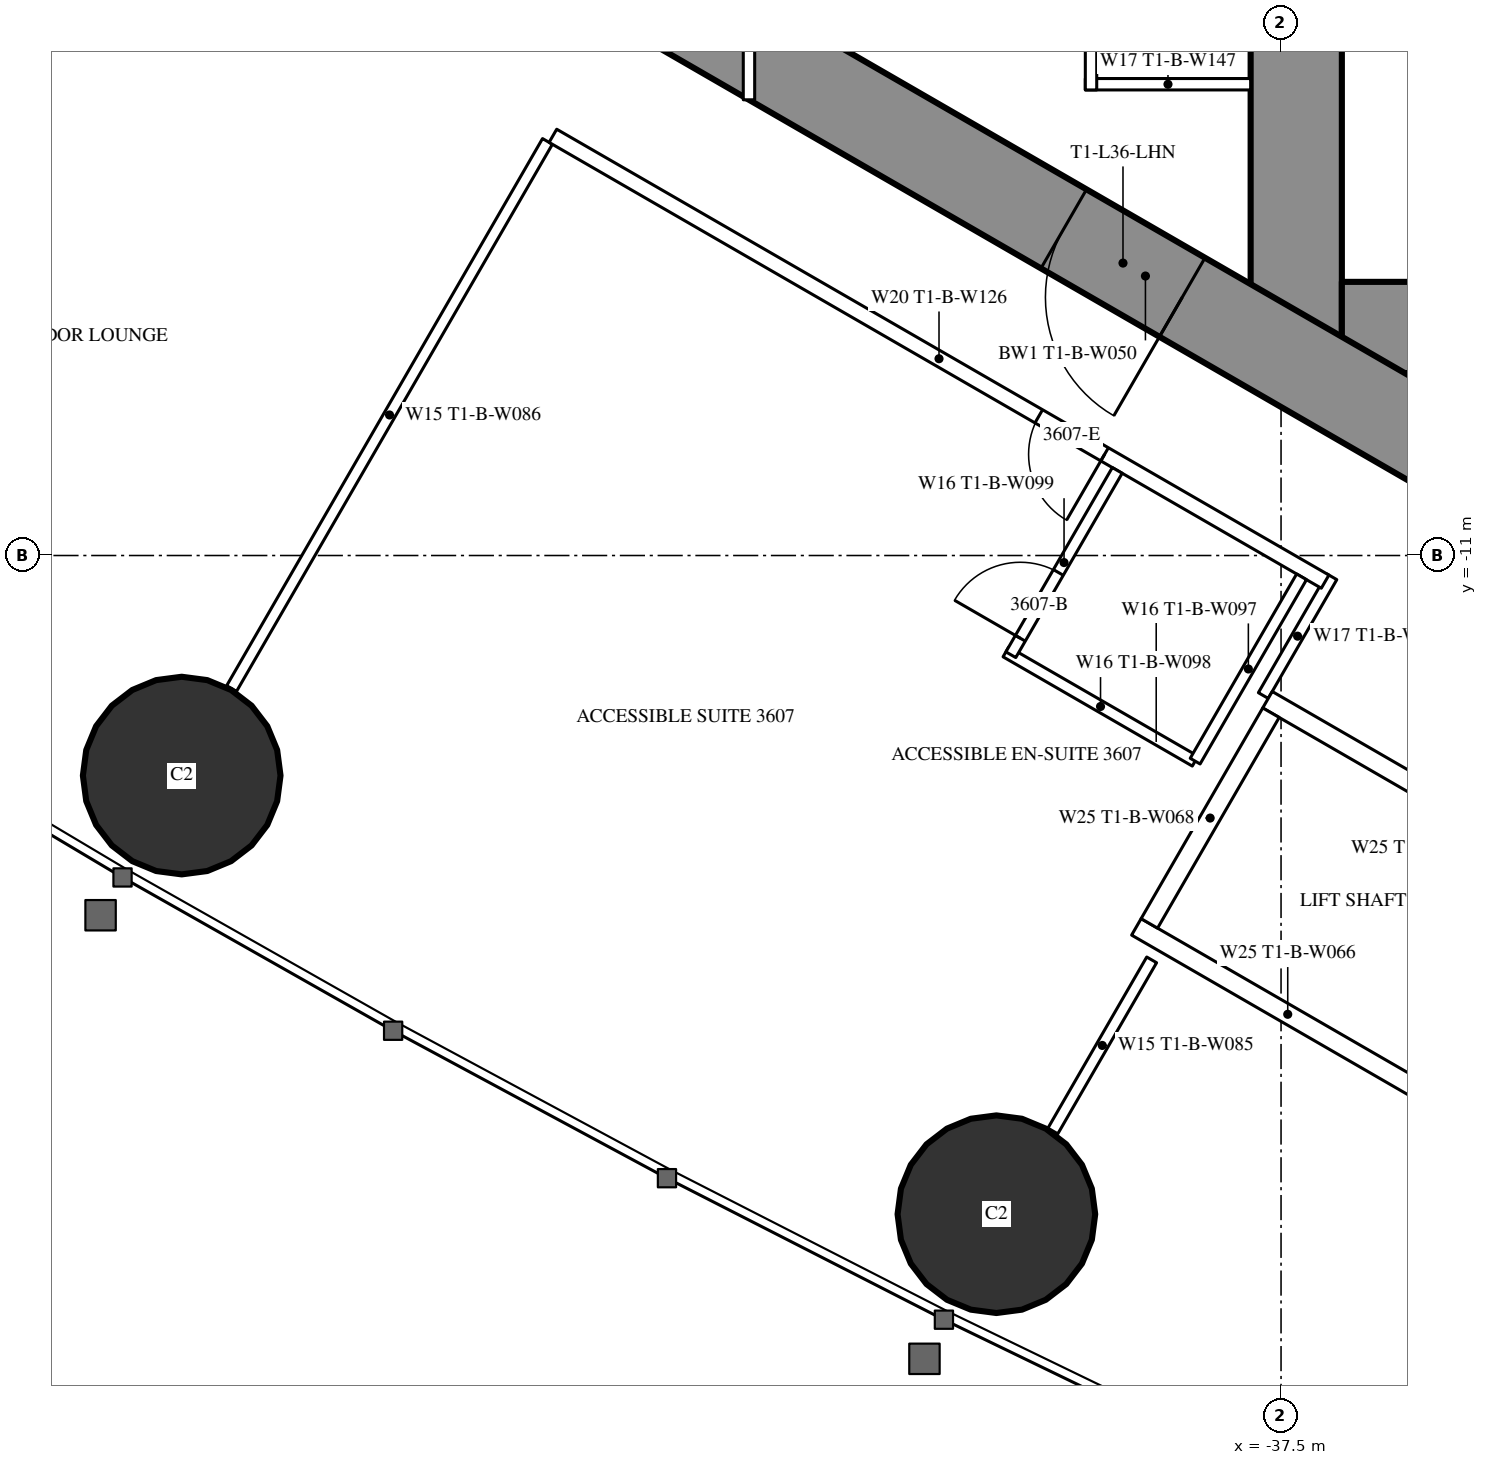
"""IFC4 building model, lengths in metres.
Left out: names, types, materials, properties, quantities, classifications, styles, units other than length and angle.
Written with IfcOpenShell. Run it as: python <this file> out.ifc"""

import sys

from ifc_helpers import new_model, si_unit, direction, frame, frame_2d, origin, origin_2d, place, context, subcontext, project, spatial, rectangle, hollow_circle, extrude, element, fill, save


model = new_model("IFC4")
c1 = context("Model", 3, precision=1e-05, world=origin(), true_north=direction((0.0, 1.0)))
c2 = subcontext(c1, "Body", "Model", "MODEL_VIEW")
j1 = project(units=[si_unit("LENGTHUNIT", "METRE"), si_unit("PLANEANGLEUNIT", "RADIAN")], contexts=[c1])
p1 = place(None, origin())
s1 = spatial("IfcSite", under=j1, at=p1, CompositionType="ELEMENT")
p2 = place(p1, origin())
s2 = spatial("IfcBuilding", under=s1, at=p2, CompositionType="ELEMENT")
p3 = place(p2, frame((0.0, 0.0, 136.1)))
s3 = spatial("IfcBuildingStorey", under=s2, at=p3, CompositionType="ELEMENT", Elevation=136.1)
for number, where, z_axis, x_axis in (
    (1, (-51.963, -13.895, 0.0), (0.0, 0.0, 1.0), (1.0, 0.0, 0.0)),
    (2, (-41.245, -19.666, 0.0), (0.0, 0.0, 1.0), (1.0, 0.0, 0.0)),
):
    element("IfcColumn", number, at=place(p3, frame(where, z_axis=z_axis, x_axis=x_axis)), inside=s3, PredefinedType="COLUMN", context=c2, shape_type="SweptSolid", body=[
        extrude(hollow_circle(Radius=1.3, WallThickness=0.1, at=origin_2d()), origin(), (0.0, 0.0, 1.0), 3.5),
    ])
p4 = place(p3, frame((-37.3, 8.6, 0.0), z_axis=(0.0, 0.0, 1.0), x_axis=(0.0, -1.0, 0.0)))
e3 = element("IfcWall", 3, at=p4, inside=s3, PredefinedType="SHEAR", context=c2, shape_type="SweptSolid", body=[
    extrude(rectangle(XDim=17.2, YDim=1.2, at=frame_2d((8.6, 0.0))), origin(), (0.0, 0.0, 1.0), 3.5),
])
p5 = place(p4, frame((7.7, 0.0, 0.0)))
e4 = element("IfcOpeningElement", 4, at=p5, cuts=e3, PredefinedType="OPENING", context=c2, shape_type="SweptSolid", body=[
    extrude(rectangle(XDim=1.8, YDim=2.2, at=frame_2d((0.9, 1.1))), frame((0.0, 0.61, 0.0), z_axis=(0.0, -1.0, 0.0), x_axis=(1.0, 0.0, 0.0)), (0.0, 0.0, 1.0), 1.22),
])
p6 = place(p3, frame((-28.3, -8.0, 0.0), z_axis=(0.0, 0.0, 1.0), x_axis=(-1.0, 0.0, 0.0)))
e5 = element("IfcWall", 5, at=p6, inside=s3, PredefinedType="SHEAR", context=c2, shape_type="SweptSolid", body=[
    extrude(rectangle(XDim=8.4, YDim=1.2, at=frame_2d((4.2, 0.0))), origin(), (0.0, 0.0, 1.0), 3.5),
])
p7 = place(p6, frame((0.25, 0.0, 0.0)))
e6 = element("IfcOpeningElement", 6, at=p7, cuts=e5, PredefinedType="OPENING", context=c2, shape_type="SweptSolid", body=[
    extrude(rectangle(XDim=1.0, YDim=2.2, at=frame_2d((0.5, 1.1))), frame((0.0, 0.61, 0.0), z_axis=(0.0, -1.0, 0.0), x_axis=(1.0, 0.0, 0.0)), (0.0, 0.0, 1.0), 1.22),
])
p8 = place(p3, frame((-27.2, -14.3, 0.0), z_axis=(0.0, 0.0, 1.0), x_axis=(-0.866024021859, 0.500002393557, 0.0)))
e7 = element("IfcWall", 7, at=p8, inside=s3, PredefinedType="SHEAR", context=c2, shape_type="SweptSolid", body=[
    extrude(rectangle(XDim=27.907, YDim=1.2, at=frame_2d((13.954, 0.0))), origin(), (0.0, 0.0, 1.0), 3.5),
])
p9 = place(p8, frame((4.6, 0.0, 0.0)))
e8 = element("IfcOpeningElement", 8, at=p9, cuts=e7, PredefinedType="OPENING", context=c2, shape_type="SweptSolid", body=[
    extrude(rectangle(XDim=1.0, YDim=2.2, at=frame_2d((0.5, 1.1))), frame((0.0, 0.61, 0.0), z_axis=(0.0, -1.0, 0.0), x_axis=(1.0, 0.0, 0.0)), (0.0, 0.0, 1.0), 1.22),
])
p10 = place(p8, frame((13.395, 0.0, 0.0)))
e9 = element("IfcOpeningElement", 9, at=p10, cuts=e7, PredefinedType="OPENING", context=c2, shape_type="SweptSolid", body=[
    extrude(rectangle(XDim=1.8, YDim=2.2, at=frame_2d((0.9, 1.1))), frame((0.0, 0.61, 0.0), z_axis=(0.0, -1.0, 0.0), x_axis=(1.0, 0.0, 0.0)), (0.0, 0.0, 1.0), 1.22),
])
p11 = place(p3, frame((-47.151, -5.552, 0.0), z_axis=(0.0, 0.0, 1.0), x_axis=(-0.500003012045, -0.866023664773, 0.0)))
e10 = element("IfcWall", 10, at=p11, inside=s3, PredefinedType="PARTITIONING", context=c2, shape_type="SweptSolid", body=[
    extrude(rectangle(XDim=8.311, YDim=0.15, at=frame_2d((4.156, 0.0))), origin(), (0.0, 0.0, 1.0), 2.2),
])
p12 = place(p3, frame((-39.202, -16.32, 0.0), z_axis=(0.0, 0.0, 1.0), x_axis=(-0.49997716683, -0.86603858612, 0.0)))
e11 = element("IfcWall", 11, at=p12, inside=s3, PredefinedType="PARTITIONING", context=c2, shape_type="SweptSolid", body=[
    extrude(rectangle(XDim=2.6, YDim=0.15, at=frame_2d((1.3, 0.0))), origin(), (0.0, 0.0, 1.0), 3.25),
])
p13 = place(p3, frame((-36.831, -11.28, 0.0), z_axis=(0.0, 0.0, 1.0), x_axis=(-0.499937177781, -0.866061671171, 0.0)))
e12 = element("IfcWall", 12, at=p13, inside=s3, PredefinedType="PARTITIONING", context=c2, shape_type="SweptSolid", body=[
    extrude(rectangle(XDim=1.804, YDim=0.15, at=frame_2d((0.902, 0.0))), origin(), (0.0, 0.0, 1.0), 3.25),
])
p14 = place(p3, frame((-36.92, -11.344, 0.0), z_axis=(0.0, 0.0, 1.0), x_axis=(-0.866027897759, 0.499995680284, 0.0)))
e13 = element("IfcWall", 13, at=p14, inside=s3, PredefinedType="PARTITIONING", context=c2, shape_type="SweptSolid", body=[
    extrude(rectangle(XDim=11.731, YDim=0.2, at=frame_2d((5.865, 0.0))), origin(), (0.0, 0.0, 1.0), 3.25),
])
p15 = place(p14, frame((3.35, 0.0, 0.0)))
e14 = element("IfcOpeningElement", 14, at=p15, cuts=e13, PredefinedType="OPENING", context=c2, shape_type="SweptSolid", body=[
    extrude(rectangle(XDim=1.0, YDim=2.2, at=frame_2d((0.5, 1.1))), frame((0.0, 0.11, 0.0), z_axis=(0.0, -1.0, 0.0), x_axis=(1.0, 0.0, 0.0)), (0.0, 0.0, 1.0), 0.22),
])
p16 = place(p3, frame((-38.63, -13.705, 0.0), z_axis=(0.0, 0.0, 1.0), x_axis=(-0.866018712932, 0.500011588718, 0.0)))
e15 = element("IfcWall", 15, at=p16, inside=s3, PredefinedType="PARTITIONING", context=c2, shape_type="SweptSolid", body=[
    extrude(rectangle(XDim=2.875, YDim=0.15, at=frame_2d((1.438, 0.0))), origin(), (0.0, 0.0, 1.0), 3.25),
])
p17 = place(p3, frame((-39.655, -9.88, 0.0), z_axis=(0.0, 0.0, 1.0), x_axis=(-0.500049511043, -0.865996816683, 0.0)))
e16 = element("IfcWall", 16, at=p17, inside=s3, PredefinedType="PARTITIONING", context=c2, shape_type="SweptSolid", body=[
    extrude(rectangle(XDim=2.8, YDim=0.15, at=frame_2d((1.4, 0.0))), origin(), (0.0, 0.0, 1.0), 3.25),
])
p18 = place(p17, frame((1.55, 0.0, 0.0)))
e17 = element("IfcOpeningElement", 17, at=p18, cuts=e16, PredefinedType="OPENING", context=c2, shape_type="SweptSolid", body=[
    extrude(rectangle(XDim=1.0, YDim=2.2, at=frame_2d((0.5, 1.1))), frame((0.0, 0.085, 0.0), z_axis=(0.0, -1.0, 0.0), x_axis=(1.0, 0.0, 0.0)), (0.0, 0.0, 1.0), 0.17),
])
p19 = place(p3, frame((-37.23, -11.281, 0.0), z_axis=(0.0, 0.0, 1.0), x_axis=(-0.500049511043, -0.865996816683, 0.0)))
e18 = element("IfcWall", 18, at=p19, inside=s3, PredefinedType="PARTITIONING", context=c2, shape_type="SweptSolid", body=[
    extrude(rectangle(XDim=2.8, YDim=0.15, at=frame_2d((1.4, 0.0))), origin(), (0.0, 0.0, 1.0), 3.25),
])
p20 = place(p3, frame((-37.9, -4.8, 0.0), z_axis=(0.0, 0.0, 1.0), x_axis=(-1.0, 0.0, 0.0)))
e19 = element("IfcWall", 19, at=p20, inside=s3, PredefinedType="PARTITIONING", context=c2, shape_type="SweptSolid", body=[
    extrude(rectangle(XDim=2.175, YDim=0.15, at=frame_2d((1.087, 0.0))), origin(), (0.0, 0.0, 1.0), 3.25),
])
p21 = place(p3, frame((-40.0, -1.125, 0.0), z_axis=(0.0, 0.0, 1.0), x_axis=(0.0, -1.0, 0.0)))
e20 = element("IfcWall", 20, at=p21, inside=s3, PredefinedType="PARTITIONING", context=c2, shape_type="SweptSolid", body=[
    extrude(rectangle(XDim=3.75, YDim=0.15, at=frame_2d((1.875, 0.0))), origin(), (0.0, 0.0, 1.0), 3.25),
])
p22 = place(p21, frame((1.375, 0.0, 0.0)))
e21 = element("IfcOpeningElement", 21, at=p22, cuts=e20, PredefinedType="OPENING", context=c2, shape_type="SweptSolid", body=[
    extrude(rectangle(XDim=1.0, YDim=2.2, at=frame_2d((0.5, 1.1))), frame((0.0, 0.085, 0.0), z_axis=(0.0, -1.0, 0.0), x_axis=(1.0, 0.0, 0.0)), (0.0, 0.0, 1.0), 0.17),
])
p23 = place(p3, frame((-44.5, 5.005, 0.0), z_axis=(0.0, 0.0, 1.0), x_axis=(0.0, -1.0, 0.0)))
e22 = element("IfcWall", 22, at=p23, inside=s3, PredefinedType="PARTITIONING", context=c2, shape_type="SweptSolid", body=[
    extrude(rectangle(XDim=10.009, YDim=0.15, at=frame_2d((5.005, 0.0))), origin(), (0.0, 0.0, 1.0), 2.45),
])
p24 = place(p23, frame((4.505, 0.0, 0.0)))
e23 = element("IfcOpeningElement", 23, at=p24, cuts=e22, PredefinedType="OPENING", context=c2, shape_type="SweptSolid", body=[
    extrude(rectangle(XDim=1.0, YDim=2.2, at=frame_2d((0.5, 1.1))), frame((0.0, 0.085, 0.0), z_axis=(0.0, -1.0, 0.0), x_axis=(1.0, 0.0, 0.0)), (0.0, 0.0, 1.0), 0.17),
])
p25 = place(p3, frame((-33.696, -15.197, 0.0), z_axis=(0.0, 0.0, 1.0), x_axis=(-0.865976953817, 0.500083908417, 0.0)))
e24 = element("IfcWall", 24, at=p25, inside=s3, PredefinedType="PARTITIONING", context=c2, shape_type="SweptSolid", body=[
    extrude(rectangle(XDim=4.599, YDim=0.25, at=frame_2d((2.3, 0.0))), origin(), (0.0, 0.0, 1.0), 3.25),
])
p26 = place(p3, frame((-35.42, -18.186, 0.0), z_axis=(0.0, 0.0, 1.0), x_axis=(-0.865990227814, 0.50006092162, 0.0)))
e25 = element("IfcWall", 25, at=p26, inside=s3, PredefinedType="PARTITIONING", context=c2, shape_type="SweptSolid", body=[
    extrude(rectangle(XDim=4.6, YDim=0.25, at=frame_2d((2.3, 0.0))), origin(), (0.0, 0.0, 1.0), 3.25),
])
p27 = place(p3, frame((-37.633, -13.068, 0.0), z_axis=(0.0, 0.0, 1.0), x_axis=(-0.499872130319, -0.866099216793, 0.0)))
e26 = element("IfcWall", 26, at=p27, inside=s3, PredefinedType="PARTITIONING", context=c2, shape_type="SweptSolid", body=[
    extrude(rectangle(XDim=3.2, YDim=0.25, at=frame_2d((1.6, 0.0))), origin(), (0.0, 0.0, 1.0), 3.25),
])
p28 = place(p18, origin())
e27 = element("IfcDoor", 27, at=p28, inside=s3, OperationType="SINGLE_SWING_RIGHT", PredefinedType="DOOR", context=c2, shape_type="SweptSolid", body=[
    extrude(rectangle(XDim=1.0, YDim=2.2, at=frame_2d((0.5, 1.1))), frame((0.0, 0.025, 0.0), z_axis=(0.0, -1.0, 0.0), x_axis=(1.0, 0.0, 0.0)), (0.0, 0.0, 1.0), 0.05),
])
fill(e17, e27)
p29 = place(p15, origin())
e28 = element("IfcDoor", 28, at=p29, inside=s3, OperationType="SINGLE_SWING_LEFT", PredefinedType="DOOR", context=c2, shape_type="SweptSolid", body=[
    extrude(rectangle(XDim=1.0, YDim=2.2, at=frame_2d((0.5, 1.1))), frame((0.0, 0.025, 0.0), z_axis=(0.0, -1.0, 0.0), x_axis=(1.0, 0.0, 0.0)), (0.0, 0.0, 1.0), 0.05),
])
fill(e14, e28)
p30 = place(p10, origin())
e29 = element("IfcDoor", 29, at=p30, inside=s3, OperationType="DOUBLE_DOOR_SINGLE_SWING", PredefinedType="DOOR", context=c2, shape_type="SweptSolid", body=[
    extrude(rectangle(XDim=1.8, YDim=2.2, at=frame_2d((0.9, 1.1))), frame((0.0, 0.025, 0.0), z_axis=(0.0, -1.0, 0.0), x_axis=(1.0, 0.0, 0.0)), (0.0, 0.0, 1.0), 0.05),
])
fill(e9, e29)
save(model, sys.argv[1])
